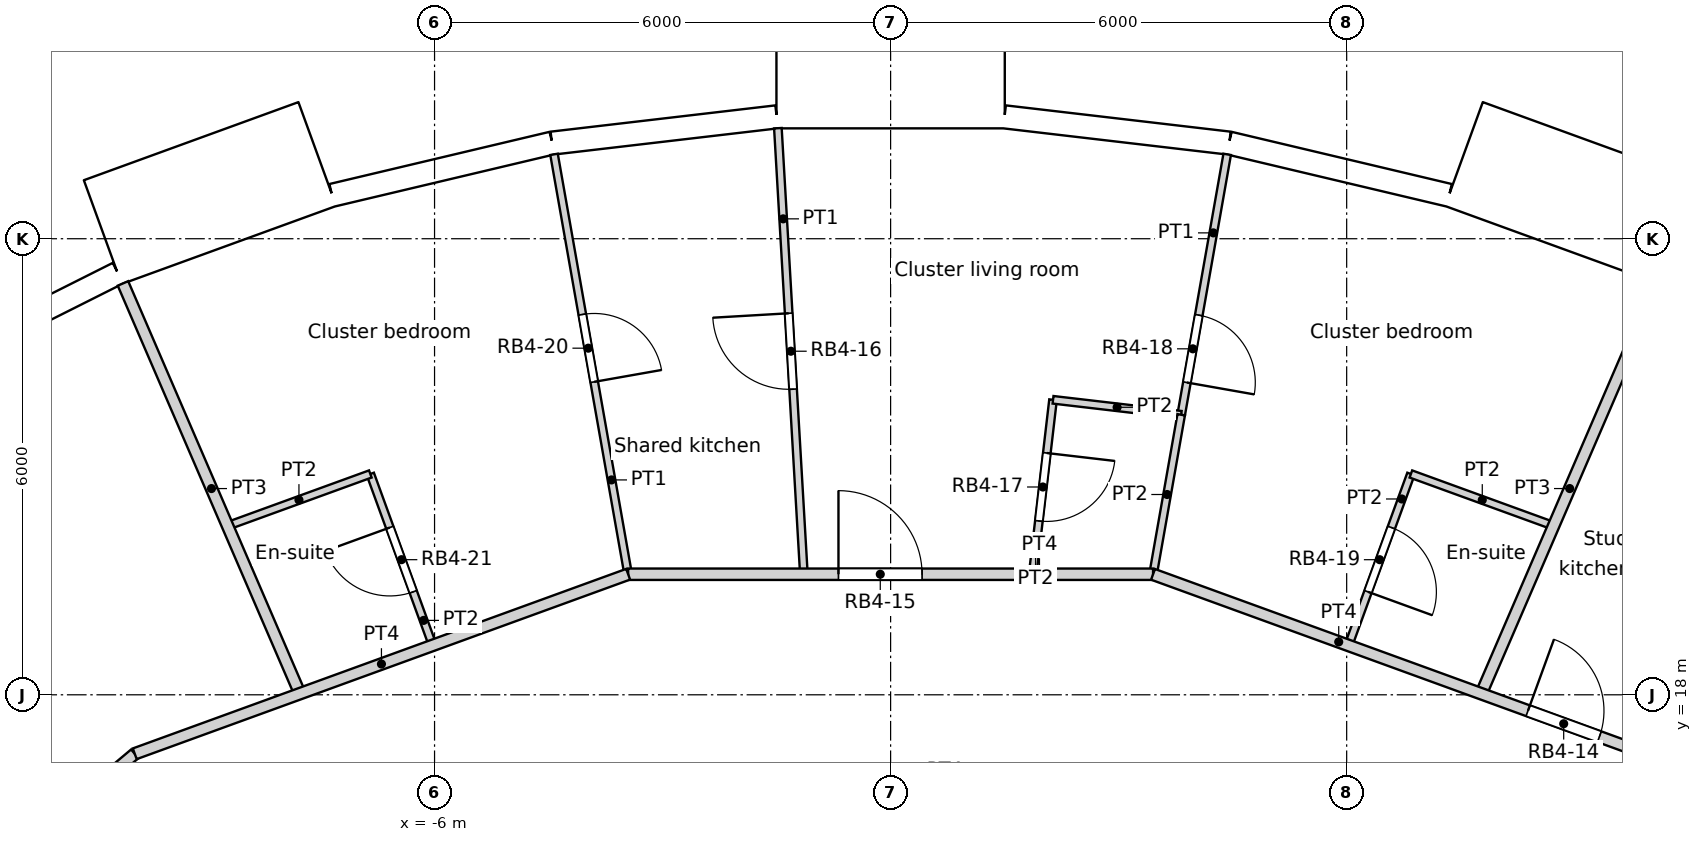
"""IFC4 building model, lengths in metres.
Left out: names, types, materials, properties, quantities, classifications, styles, units other than length and angle.
Written with IfcOpenShell. Run it as: python <this file> out.ifc"""

import sys

from ifc_helpers import new_model, si_unit, direction, frame, frame_2d, origin, origin_2d, place, context, subcontext, project, spatial, rectangle, circle, extrude, element, fill, save


model = new_model("IFC4")
c1 = context("Model", 3, precision=1e-05, world=origin(), true_north=direction((0.0, 1.0)))
c2 = subcontext(c1, "Body", "Model", "MODEL_VIEW")
j1 = project(units=[si_unit("LENGTHUNIT", "METRE"), si_unit("PLANEANGLEUNIT", "RADIAN")], contexts=[c1])
p1 = place(None, origin())
s1 = spatial("IfcSite", under=j1, at=p1, CompositionType="ELEMENT")
p2 = place(p1, origin())
s2 = spatial("IfcBuilding", under=s1, at=p2, CompositionType="ELEMENT")
p3 = place(p2, frame((0.0, 0.0, 158.4)))
s3 = spatial("IfcBuildingStorey", under=s2, at=p3, CompositionType="ELEMENT", Elevation=158.4)
for number, where, z_axis, x_axis in (
    (1, (9.723, 22.54, 0.0), (0.0, 0.0, 1.0), (1.0, 0.0, 0.0)),
    (2, (4.263, 24.175, 0.0), (0.0, 0.0, 1.0), (1.0, 0.0, 0.0)),
    (3, (-1.427, 24.506, 0.0), (0.0, 0.0, 1.0), (1.0, 0.0, 0.0)),
    (4, (-7.04, 23.516, 0.0), (0.0, 0.0, 1.0), (1.0, 0.0, 0.0)),
):
    element("IfcColumn", number, at=place(p3, frame(where, z_axis=z_axis, x_axis=x_axis)), inside=s3, PredefinedType="COLUMN", context=c2, shape_type="SweptSolid", body=[
        extrude(circle(Radius=0.6, at=origin_2d()), origin(), (0.0, 0.0, 1.0), 3.6),
    ])
for number, where, z_axis, x_axis in (
    (5, (6.876, 17.521, 0.0), (0.0, 0.0, 1.0), (1.0, 0.0, 0.0)),
    (6, (1.406, 18.77, 0.0), (0.0, 0.0, 1.0), (1.0, 0.0, 0.0)),
    (7, (-4.188, 18.35, 0.0), (0.0, 0.0, 1.0), (1.0, 0.0, 0.0)),
):
    element("IfcColumn", number, at=place(p3, frame(where, z_axis=z_axis, x_axis=x_axis)), inside=s3, PredefinedType="COLUMN", context=c2, shape_type="SweptSolid", body=[
        extrude(circle(Radius=0.65, at=origin_2d()), origin(), (0.0, 0.0, 1.0), 3.6),
    ])
p4 = place(p3, frame((10.363, 24.087, -0.3), z_axis=(0.0, 0.0, 1.0), x_axis=(-0.939686455819, 0.342037080957, 0.0)))
e8 = element("IfcWall", 8, at=p4, inside=s3, PredefinedType="ELEMENTEDWALL", context=c2, shape_type="SweptSolid", body=[
    extrude(rectangle(XDim=3.0, YDim=1.45, at=frame_2d((1.5, 0.0))), origin(), (0.0, 0.0, 1.0), 3.6),
])
p5 = place(p4, frame((1.5, 0.0, 1.85)))
e9 = element("IfcOpeningElement", 9, at=p5, cuts=e8, PredefinedType="OPENING", context=c2, shape_type="SweptSolid", body=[
    extrude(circle(Radius=0.9, at=origin_2d()), frame((0.0, 0.735, 0.0), z_axis=(0.0, -1.0, 0.0), x_axis=(1.0, 0.0, 0.0)), (0.0, 0.0, 1.0), 1.47),
])
p6 = place(p3, frame((7.346, 24.572, 0.0), z_axis=(0.0, 0.0, 1.0), x_axis=(-0.973049746156, 0.230595298102, 0.0)))
e10 = element("IfcWall", 10, at=p6, inside=s3, PredefinedType="SOLIDWALL", context=c2, shape_type="SweptSolid", body=[
    extrude(rectangle(XDim=2.973, YDim=0.3, at=frame_2d((1.486, 0.0))), origin(), (0.0, 0.0, 1.0), 3.3),
])
p7 = place(p6, frame((1.486, 0.0, 1.55)))
e11 = element("IfcOpeningElement", 11, at=p7, cuts=e10, PredefinedType="OPENING", context=c2, shape_type="SweptSolid", body=[
    extrude(circle(Radius=0.9, at=origin_2d()), frame((0.0, 0.16, 0.0), z_axis=(0.0, -1.0, 0.0), x_axis=(1.0, 0.0, 0.0)), (0.0, 0.0, 1.0), 0.32),
])
p8 = place(p3, frame((4.454, 25.258, 0.0), z_axis=(0.0, 0.0, 1.0), x_axis=(-0.993235542767, 0.116116995244, 0.0)))
e12 = element("IfcWall", 12, at=p8, inside=s3, PredefinedType="SOLIDWALL", context=c2, shape_type="SweptSolid", body=[
    extrude(rectangle(XDim=2.973, YDim=0.3, at=frame_2d((1.486, 0.0))), origin(), (0.0, 0.0, 1.0), 3.3),
])
p9 = place(p8, frame((1.486, 0.0, 1.55)))
e13 = element("IfcOpeningElement", 13, at=p9, cuts=e12, PredefinedType="OPENING", context=c2, shape_type="SweptSolid", body=[
    extrude(circle(Radius=0.9, at=origin_2d()), frame((0.0, 0.16, 0.0), z_axis=(0.0, -1.0, 0.0), x_axis=(1.0, 0.0, 0.0)), (0.0, 0.0, 1.0), 0.32),
])
p10 = place(p3, frame((1.5, 26.179, -0.3), z_axis=(0.0, 0.0, 1.0), x_axis=(-1.0, 0.0, 0.0)))
e14 = element("IfcWall", 14, at=p10, inside=s3, PredefinedType="ELEMENTEDWALL", context=c2, shape_type="SweptSolid", body=[
    extrude(rectangle(XDim=3.0, YDim=1.45, at=frame_2d((1.5, 0.0))), origin(), (0.0, 0.0, 1.0), 3.6),
])
p11 = place(p10, frame((1.5, 0.0, 1.85)))
e15 = element("IfcOpeningElement", 15, at=p11, cuts=e14, PredefinedType="OPENING", context=c2, shape_type="SweptSolid", body=[
    extrude(circle(Radius=0.9, at=origin_2d()), frame((0.0, 0.735, 0.0), z_axis=(0.0, -1.0, 0.0), x_axis=(1.0, 0.0, 0.0)), (0.0, 0.0, 1.0), 1.47),
])
p12 = place(p3, frame((-1.501, 25.603, 0.0), z_axis=(0.0, 0.0, 1.0), x_axis=(-0.993235542767, -0.116116995244, 0.0)))
e16 = element("IfcWall", 16, at=p12, inside=s3, PredefinedType="SOLIDWALL", context=c2, shape_type="SweptSolid", body=[
    extrude(rectangle(XDim=2.973, YDim=0.3, at=frame_2d((1.486, 0.0))), origin(), (0.0, 0.0, 1.0), 3.3),
])
p13 = place(p12, frame((1.486, 0.0, 1.55)))
e17 = element("IfcOpeningElement", 17, at=p13, cuts=e16, PredefinedType="OPENING", context=c2, shape_type="SweptSolid", body=[
    extrude(circle(Radius=0.9, at=origin_2d()), frame((0.0, 0.16, 0.0), z_axis=(0.0, -1.0, 0.0), x_axis=(1.0, 0.0, 0.0)), (0.0, 0.0, 1.0), 0.32),
])
p14 = place(p3, frame((-4.454, 25.258, 0.0), z_axis=(0.0, 0.0, 1.0), x_axis=(-0.973049746156, -0.230595298102, 0.0)))
e18 = element("IfcWall", 18, at=p14, inside=s3, PredefinedType="SOLIDWALL", context=c2, shape_type="SweptSolid", body=[
    extrude(rectangle(XDim=2.973, YDim=0.3, at=frame_2d((1.486, 0.0))), origin(), (0.0, 0.0, 1.0), 3.3),
])
p15 = place(p14, frame((1.486, 0.0, 1.55)))
e19 = element("IfcOpeningElement", 19, at=p15, cuts=e18, PredefinedType="OPENING", context=c2, shape_type="SweptSolid", body=[
    extrude(circle(Radius=0.9, at=origin_2d()), frame((0.0, 0.16, 0.0), z_axis=(0.0, -1.0, 0.0), x_axis=(1.0, 0.0, 0.0)), (0.0, 0.0, 1.0), 0.32),
])
p16 = place(p3, frame((-7.544, 25.113, -0.3), z_axis=(0.0, 0.0, 1.0), x_axis=(-0.939686455819, -0.342037080957, 0.0)))
e20 = element("IfcWall", 20, at=p16, inside=s3, PredefinedType="ELEMENTEDWALL", context=c2, shape_type="SweptSolid", body=[
    extrude(rectangle(XDim=3.0, YDim=1.45, at=frame_2d((1.5, 0.0))), origin(), (0.0, 0.0, 1.0), 3.6),
])
p17 = place(p16, frame((1.5, 0.0, 1.85)))
e21 = element("IfcOpeningElement", 21, at=p17, cuts=e20, PredefinedType="OPENING", context=c2, shape_type="SweptSolid", body=[
    extrude(circle(Radius=0.9, at=origin_2d()), frame((0.0, 0.735, 0.0), z_axis=(0.0, -1.0, 0.0), x_axis=(1.0, 0.0, 0.0)), (0.0, 0.0, 1.0), 1.47),
])
p18 = place(p3, frame((-10.167, 23.546, 0.0), z_axis=(0.0, 0.0, 1.0), x_axis=(-0.893637442555, -0.448789618045, 0.0)))
e22 = element("IfcWall", 22, at=p18, inside=s3, PredefinedType="SOLIDWALL", context=c2, shape_type="SweptSolid", body=[
    extrude(rectangle(XDim=2.973, YDim=0.3, at=frame_2d((1.486, 0.0))), origin(), (0.0, 0.0, 1.0), 3.3),
])
p19 = place(p18, frame((1.486, 0.0, 1.55)))
e23 = element("IfcOpeningElement", 23, at=p19, cuts=e22, PredefinedType="OPENING", context=c2, shape_type="SweptSolid", body=[
    extrude(circle(Radius=0.9, at=origin_2d()), frame((0.0, 0.16, 0.0), z_axis=(0.0, -1.0, 0.0), x_axis=(1.0, 0.0, 0.0)), (0.0, 0.0, 1.0), 0.32),
])
p20 = place(p3, frame((3.452, 19.585, 0.0), z_axis=(0.0, 0.0, 1.0), x_axis=(0.939737689664, -0.341896292208, 0.0)))
e24 = element("IfcWall", 24, at=p20, inside=s3, PredefinedType="PARTITIONING", context=c2, shape_type="SweptSolid", body=[
    extrude(rectangle(XDim=6.908, YDim=0.15, at=frame_2d((3.454, 0.0))), origin(), (0.0, 0.0, 1.0), 3.3),
])
p21 = place(p20, frame((5.249, 0.0, 0.0)))
e25 = element("IfcOpeningElement", 25, at=p21, cuts=e24, PredefinedType="OPENING", context=c2, shape_type="SweptSolid", body=[
    extrude(rectangle(XDim=1.0, YDim=2.1, at=frame_2d((0.5, 1.05))), frame((0.0, 0.075, 0.0), z_axis=(0.0, -1.0, 0.0), x_axis=(1.0, 0.0, 0.0)), (0.0, 0.0, 1.0), 0.15),
])
p22 = place(p3, frame((-3.453, 19.586, 0.0), z_axis=(0.0, 0.0, 1.0), x_axis=(1.0, 0.0, 0.0)))
e26 = element("IfcWall", 26, at=p22, inside=s3, PredefinedType="PARTITIONING", context=c2, shape_type="SweptSolid", body=[
    extrude(rectangle(XDim=6.906, YDim=0.15, at=frame_2d((3.453, 0.0))), origin(), (0.0, 0.0, 1.0), 3.3),
])
p23 = place(p22, frame((2.767, 0.0, 0.0)))
e27 = element("IfcOpeningElement", 27, at=p23, cuts=e26, PredefinedType="OPENING", context=c2, shape_type="SweptSolid", body=[
    extrude(rectangle(XDim=1.1, YDim=2.1, at=frame_2d((0.55, 1.05))), frame((0.0, 0.075, 0.0), z_axis=(0.0, -1.0, 0.0), x_axis=(1.0, 0.0, 0.0)), (0.0, 0.0, 1.0), 0.15),
])
p24 = place(p3, frame((-9.944, 17.224, 0.0), z_axis=(0.0, 0.0, 1.0), x_axis=(0.939722202107, 0.341938858377, 0.0)))
e28 = element("IfcWall", 28, at=p24, inside=s3, PredefinedType="PARTITIONING", context=c2, shape_type="SweptSolid", body=[
    extrude(rectangle(XDim=6.908, YDim=0.15, at=frame_2d((3.454, 0.0))), origin(), (0.0, 0.0, 1.0), 3.3),
])
p25 = place(p3, frame((-15.235, 12.784, 0.0), z_axis=(0.0, 0.0, 1.0), x_axis=(0.766064078986, 0.642764207845, 0.0)))
e29 = element("IfcWall", 29, at=p25, inside=s3, PredefinedType="PARTITIONING", context=c2, shape_type="SweptSolid", body=[
    extrude(rectangle(XDim=6.906, YDim=0.15, at=frame_2d((3.453, 0.0))), origin(), (0.0, 0.0, 1.0), 3.3),
])
p26 = place(p25, frame((3.823, 0.0, 0.0)))
e30 = element("IfcOpeningElement", 30, at=p26, cuts=e29, PredefinedType="OPENING", context=c2, shape_type="SweptSolid", body=[
    extrude(rectangle(XDim=1.0, YDim=2.04, at=frame_2d((0.5, 1.02))), frame((0.0, 0.075, 0.0), z_axis=(0.0, -1.0, 0.0), x_axis=(1.0, 0.0, 0.0)), (0.0, 0.0, 1.0), 0.15),
])
p27 = place(p3, frame((7.77, 18.015, 0.0), z_axis=(0.0, 0.0, 1.0), x_axis=(0.396238716554, 0.918147526002, 0.0)))
e31 = element("IfcWall", 31, at=p27, inside=s3, PredefinedType="PARTITIONING", context=c2, shape_type="SweptSolid", body=[
    extrude(rectangle(XDim=5.879, YDim=0.15, at=frame_2d((2.939, 0.0))), origin(), (0.0, 0.0, 1.0), 3.3),
])
p28 = place(p3, frame((-1.483, 25.454, 0.0), z_axis=(0.0, 0.0, 1.0), x_axis=(0.058147412668, -0.998308007781, 0.0)))
e32 = element("IfcWall", 32, at=p28, inside=s3, PredefinedType="PARTITIONING", context=c2, shape_type="SweptSolid", body=[
    extrude(rectangle(XDim=5.878, YDim=0.1, at=frame_2d((2.939, 0.0))), origin(), (0.0, 0.0, 1.0), 3.3),
])
p29 = place(p28, frame((2.439, 0.0, 0.0)))
e33 = element("IfcOpeningElement", 33, at=p29, cuts=e32, PredefinedType="OPENING", context=c2, shape_type="SweptSolid", body=[
    extrude(rectangle(XDim=1.0, YDim=2.04, at=frame_2d((0.5, 1.02))), frame((0.0, 0.05, 0.0), z_axis=(0.0, -1.0, 0.0), x_axis=(1.0, 0.0, 0.0)), (0.0, 0.0, 1.0), 0.1),
])
p30 = place(p3, frame((2.137, 21.881, 0.0), z_axis=(0.0, 0.0, 1.0), x_axis=(0.993241601719, -0.11606515676, 0.0)))
e34 = element("IfcWall", 34, at=p30, inside=s3, PredefinedType="PARTITIONING", context=c2, shape_type="SweptSolid", body=[
    extrude(rectangle(XDim=1.698, YDim=0.1, at=frame_2d((0.849, 0.0))), origin(), (0.0, 0.0, 1.0), 3.3),
])
p31 = place(p3, frame((1.869, 19.586, 0.0), z_axis=(0.0, 0.0, 1.0), x_axis=(0.116007517533, 0.993248335451, 0.0)))
e35 = element("IfcWall", 35, at=p31, inside=s3, PredefinedType="PARTITIONING", context=c2, shape_type="SweptSolid", body=[
    extrude(rectangle(XDim=2.311, YDim=0.1, at=frame_2d((1.155, 0.0))), origin(), (0.0, 0.0, 1.0), 3.3),
])
p32 = place(p31, frame((0.706, 0.0, 0.0)))
e36 = element("IfcOpeningElement", 36, at=p32, cuts=e35, PredefinedType="OPENING", context=c2, shape_type="SweptSolid", body=[
    extrude(rectangle(XDim=0.9, YDim=2.0, at=frame_2d((0.45, 1.0))), frame((0.0, 0.05, 0.0), z_axis=(0.0, -1.0, 0.0), x_axis=(1.0, 0.0, 0.0)), (0.0, 0.0, 1.0), 0.1),
])
p33 = place(p3, frame((3.823, 21.684, 0.0), z_axis=(0.0, 0.0, 1.0), x_axis=(0.173893421059, 0.984764478499, 0.0)))
e37 = element("IfcWall", 37, at=p33, inside=s3, PredefinedType="PARTITIONING", context=c2, shape_type="SweptSolid", body=[
    extrude(rectangle(XDim=3.479, YDim=0.1, at=frame_2d((1.74, 0.0))), origin(), (0.0, 0.0, 1.0), 3.3),
])
p34 = place(p33, frame((0.431, 0.0, 0.0)))
e38 = element("IfcOpeningElement", 38, at=p34, cuts=e37, PredefinedType="OPENING", context=c2, shape_type="SweptSolid", body=[
    extrude(rectangle(XDim=0.9, YDim=2.1, at=frame_2d((0.45, 1.05))), frame((0.0, 0.05, 0.0), z_axis=(0.0, -1.0, 0.0), x_axis=(1.0, 0.0, 0.0)), (0.0, 0.0, 1.0), 0.1),
])
p35 = place(p3, frame((-4.428, 25.11, 0.0), z_axis=(0.0, 0.0, 1.0), x_axis=(0.17382754149, -0.984776109489, 0.0)))
e39 = element("IfcWall", 39, at=p35, inside=s3, PredefinedType="PARTITIONING", context=c2, shape_type="SweptSolid", body=[
    extrude(rectangle(XDim=5.61, YDim=0.1, at=frame_2d((2.805, 0.0))), origin(), (0.0, 0.0, 1.0), 3.3),
])
p36 = place(p35, frame((2.139, 0.0, 0.0)))
e40 = element("IfcOpeningElement", 40, at=p36, cuts=e39, PredefinedType="OPENING", context=c2, shape_type="SweptSolid", body=[
    extrude(rectangle(XDim=0.9, YDim=2.1, at=frame_2d((0.45, 1.05))), frame((0.0, 0.05, 0.0), z_axis=(0.0, -1.0, 0.0), x_axis=(1.0, 0.0, 0.0)), (0.0, 0.0, 1.0), 0.1),
])
p37 = place(p3, frame((3.453, 19.586, 0.0), z_axis=(0.0, 0.0, 1.0), x_axis=(0.173719962819, 0.984795092655, 0.0)))
e41 = element("IfcWall", 41, at=p37, inside=s3, PredefinedType="PARTITIONING", context=c2, shape_type="SweptSolid", body=[
    extrude(rectangle(XDim=2.131, YDim=0.1, at=frame_2d((1.065, 0.0))), origin(), (0.0, 0.0, 1.0), 3.3),
])
p38 = place(p3, frame((6.845, 20.905, 0.0), z_axis=(0.0, 0.0, 1.0), x_axis=(0.939757747305, -0.341841156651, 0.0)))
e42 = element("IfcWall", 42, at=p38, inside=s3, PredefinedType="PARTITIONING", context=c2, shape_type="SweptSolid", body=[
    extrude(rectangle(XDim=1.998, YDim=0.1, at=frame_2d((0.999, 0.0))), origin(), (0.0, 0.0, 1.0), 3.3),
])
p39 = place(p3, frame((6.024, 18.65, 0.0), z_axis=(0.0, 0.0, 1.0), x_axis=(0.342110593602, 0.939659694648, 0.0)))
e43 = element("IfcWall", 43, at=p39, inside=s3, PredefinedType="PARTITIONING", context=c2, shape_type="SweptSolid", body=[
    extrude(rectangle(XDim=2.4, YDim=0.1, at=frame_2d((1.2, 0.0))), origin(), (0.0, 0.0, 1.0), 3.3),
])
p40 = place(p39, frame((0.75, 0.0, 0.0)))
e44 = element("IfcOpeningElement", 44, at=p40, cuts=e43, PredefinedType="OPENING", context=c2, shape_type="SweptSolid", body=[
    extrude(rectangle(XDim=0.9, YDim=2.04, at=frame_2d((0.45, 1.02))), frame((0.0, 0.05, 0.0), z_axis=(0.0, -1.0, 0.0), x_axis=(1.0, 0.0, 0.0)), (0.0, 0.0, 1.0), 0.1),
])
p41 = place(p3, frame((-6.845, 20.905, 0.0), z_axis=(0.0, 0.0, 1.0), x_axis=(0.342110593602, -0.939659694648, 0.0)))
e45 = element("IfcWall", 45, at=p41, inside=s3, PredefinedType="PARTITIONING", context=c2, shape_type="SweptSolid", body=[
    extrude(rectangle(XDim=2.4, YDim=0.1, at=frame_2d((1.2, 0.0))), origin(), (0.0, 0.0, 1.0), 3.3),
])
p42 = place(p41, frame((0.75, 0.0, 0.0)))
e46 = element("IfcOpeningElement", 46, at=p42, cuts=e45, PredefinedType="OPENING", context=c2, shape_type="SweptSolid", body=[
    extrude(rectangle(XDim=0.9, YDim=2.04, at=frame_2d((0.45, 1.02))), frame((0.0, 0.05, 0.0), z_axis=(0.0, -1.0, 0.0), x_axis=(1.0, 0.0, 0.0)), (0.0, 0.0, 1.0), 0.1),
])
p43 = place(p3, frame((-8.723, 20.222, 0.0), z_axis=(0.0, 0.0, 1.0), x_axis=(0.939757747305, 0.341841156651, 0.0)))
e47 = element("IfcWall", 47, at=p43, inside=s3, PredefinedType="PARTITIONING", context=c2, shape_type="SweptSolid", body=[
    extrude(rectangle(XDim=1.998, YDim=0.1, at=frame_2d((0.999, 0.0))), origin(), (0.0, 0.0, 1.0), 3.3),
])
p44 = place(p3, frame((-10.099, 23.412, 0.0), z_axis=(0.0, 0.0, 1.0), x_axis=(0.396103469133, -0.918205882001, 0.0)))
e48 = element("IfcWall", 48, at=p44, inside=s3, PredefinedType="PARTITIONING", context=c2, shape_type="SweptSolid", body=[
    extrude(rectangle(XDim=5.879, YDim=0.15, at=frame_2d((2.939, 0.0))), origin(), (0.0, 0.0, 1.0), 3.3),
])
p45 = place(p5, origin())
e49 = element("IfcWindow", 49, at=p45, inside=s3, PartitioningType="SINGLE_PANEL", PredefinedType="WINDOW", context=c2, shape_type="SweptSolid", body=[
    extrude(circle(Radius=0.9, at=origin_2d()), frame((0.0, 0.695, 0.0), z_axis=(0.0, -1.0, 0.0), x_axis=(1.0, 0.0, 0.0)), (0.0, 0.0, 1.0), 0.1),
])
fill(e9, e49)
p46 = place(p7, origin())
e50 = element("IfcWindow", 50, at=p46, inside=s3, PartitioningType="SINGLE_PANEL", PredefinedType="WINDOW", context=c2, shape_type="SweptSolid", body=[
    extrude(circle(Radius=0.9, at=origin_2d()), frame((0.0, 0.12, 0.0), z_axis=(0.0, -1.0, 0.0), x_axis=(1.0, 0.0, 0.0)), (0.0, 0.0, 1.0), 0.1),
])
fill(e11, e50)
p47 = place(p9, origin())
e51 = element("IfcWindow", 51, at=p47, inside=s3, PartitioningType="SINGLE_PANEL", PredefinedType="WINDOW", context=c2, shape_type="SweptSolid", body=[
    extrude(circle(Radius=0.9, at=origin_2d()), frame((0.0, 0.12, 0.0), z_axis=(0.0, -1.0, 0.0), x_axis=(1.0, 0.0, 0.0)), (0.0, 0.0, 1.0), 0.1),
])
fill(e13, e51)
p48 = place(p11, origin())
e52 = element("IfcWindow", 52, at=p48, inside=s3, PartitioningType="SINGLE_PANEL", PredefinedType="WINDOW", context=c2, shape_type="SweptSolid", body=[
    extrude(circle(Radius=0.9, at=origin_2d()), frame((0.0, 0.695, 0.0), z_axis=(0.0, -1.0, 0.0), x_axis=(1.0, 0.0, 0.0)), (0.0, 0.0, 1.0), 0.1),
])
fill(e15, e52)
p49 = place(p13, origin())
e53 = element("IfcWindow", 53, at=p49, inside=s3, PartitioningType="SINGLE_PANEL", PredefinedType="WINDOW", context=c2, shape_type="SweptSolid", body=[
    extrude(circle(Radius=0.9, at=origin_2d()), frame((0.0, 0.12, 0.0), z_axis=(0.0, -1.0, 0.0), x_axis=(1.0, 0.0, 0.0)), (0.0, 0.0, 1.0), 0.1),
])
fill(e17, e53)
p50 = place(p15, origin())
e54 = element("IfcWindow", 54, at=p50, inside=s3, PartitioningType="SINGLE_PANEL", PredefinedType="WINDOW", context=c2, shape_type="SweptSolid", body=[
    extrude(circle(Radius=0.9, at=origin_2d()), frame((0.0, 0.12, 0.0), z_axis=(0.0, -1.0, 0.0), x_axis=(1.0, 0.0, 0.0)), (0.0, 0.0, 1.0), 0.1),
])
fill(e19, e54)
p51 = place(p17, origin())
e55 = element("IfcWindow", 55, at=p51, inside=s3, PartitioningType="SINGLE_PANEL", PredefinedType="WINDOW", context=c2, shape_type="SweptSolid", body=[
    extrude(circle(Radius=0.9, at=origin_2d()), frame((0.0, 0.695, 0.0), z_axis=(0.0, -1.0, 0.0), x_axis=(1.0, 0.0, 0.0)), (0.0, 0.0, 1.0), 0.1),
])
fill(e21, e55)
p52 = place(p19, origin())
e56 = element("IfcWindow", 56, at=p52, inside=s3, PartitioningType="SINGLE_PANEL", PredefinedType="WINDOW", context=c2, shape_type="SweptSolid", body=[
    extrude(circle(Radius=0.9, at=origin_2d()), frame((0.0, 0.12, 0.0), z_axis=(0.0, -1.0, 0.0), x_axis=(1.0, 0.0, 0.0)), (0.0, 0.0, 1.0), 0.1),
])
fill(e23, e56)
p53 = place(p21, origin())
e57 = element("IfcDoor", 57, at=p53, inside=s3, OperationType="SINGLE_SWING_LEFT", PredefinedType="DOOR", context=c2, shape_type="SweptSolid", body=[
    extrude(rectangle(XDim=1.0, YDim=2.1, at=frame_2d((0.5, 1.05))), frame((0.0, 0.025, 0.0), z_axis=(0.0, -1.0, 0.0), x_axis=(1.0, 0.0, 0.0)), (0.0, 0.0, 1.0), 0.05),
])
fill(e25, e57)
p54 = place(p23, origin())
e58 = element("IfcDoor", 58, at=p54, inside=s3, OperationType="SINGLE_SWING_LEFT", PredefinedType="DOOR", context=c2, shape_type="SweptSolid", body=[
    extrude(rectangle(XDim=1.1, YDim=2.1, at=frame_2d((0.55, 1.05))), frame((0.0, 0.025, 0.0), z_axis=(0.0, -1.0, 0.0), x_axis=(1.0, 0.0, 0.0)), (0.0, 0.0, 1.0), 0.05),
])
fill(e27, e58)
p55 = place(p29, origin())
e59 = element("IfcDoor", 59, at=p55, inside=s3, OperationType="SINGLE_SWING_RIGHT", PredefinedType="DOOR", context=c2, shape_type="SweptSolid", body=[
    extrude(rectangle(XDim=1.0, YDim=2.04, at=frame_2d((0.5, 1.02))), frame((0.0, 0.025, 0.0), z_axis=(0.0, -1.0, 0.0), x_axis=(1.0, 0.0, 0.0)), (0.0, 0.0, 1.0), 0.05),
])
fill(e33, e59)
p56 = place(p32, origin())
e60 = element("IfcDoor", 60, at=p56, inside=s3, OperationType="SINGLE_SWING_LEFT", PredefinedType="DOOR", context=c2, shape_type="SweptSolid", body=[
    extrude(rectangle(XDim=0.9, YDim=2.0, at=frame_2d((0.45, 1.0))), frame((0.0, 0.025, 0.0), z_axis=(0.0, -1.0, 0.0), x_axis=(1.0, 0.0, 0.0)), (0.0, 0.0, 1.0), 0.05),
])
fill(e36, e60)
p57 = place(p34, origin())
e61 = element("IfcDoor", 61, at=p57, inside=s3, OperationType="SINGLE_SWING_RIGHT", PredefinedType="DOOR", context=c2, shape_type="SweptSolid", body=[
    extrude(rectangle(XDim=0.9, YDim=2.1, at=frame_2d((0.45, 1.05))), frame((0.0, 0.025, 0.0), z_axis=(0.0, -1.0, 0.0), x_axis=(1.0, 0.0, 0.0)), (0.0, 0.0, 1.0), 0.05),
])
fill(e38, e61)
p58 = place(p40, origin())
e62 = element("IfcDoor", 62, at=p58, inside=s3, OperationType="SINGLE_SWING_RIGHT", PredefinedType="DOOR", context=c2, shape_type="SweptSolid", body=[
    extrude(rectangle(XDim=0.9, YDim=2.04, at=frame_2d((0.45, 1.02))), frame((0.0, 0.025, 0.0), z_axis=(0.0, -1.0, 0.0), x_axis=(1.0, 0.0, 0.0)), (0.0, 0.0, 1.0), 0.05),
])
fill(e44, e62)
p59 = place(p36, origin())
e63 = element("IfcDoor", 63, at=p59, inside=s3, OperationType="SINGLE_SWING_RIGHT", PredefinedType="DOOR", context=c2, shape_type="SweptSolid", body=[
    extrude(rectangle(XDim=0.9, YDim=2.1, at=frame_2d((0.45, 1.05))), frame((0.0, 0.025, 0.0), z_axis=(0.0, -1.0, 0.0), x_axis=(1.0, 0.0, 0.0)), (0.0, 0.0, 1.0), 0.05),
])
fill(e40, e63)
p60 = place(p42, origin())
e64 = element("IfcDoor", 64, at=p60, inside=s3, OperationType="SINGLE_SWING_RIGHT", PredefinedType="DOOR", context=c2, shape_type="SweptSolid", body=[
    extrude(rectangle(XDim=0.9, YDim=2.04, at=frame_2d((0.45, 1.02))), frame((0.0, 0.025, 0.0), z_axis=(0.0, -1.0, 0.0), x_axis=(1.0, 0.0, 0.0)), (0.0, 0.0, 1.0), 0.05),
])
fill(e46, e64)
save(model, sys.argv[1])
